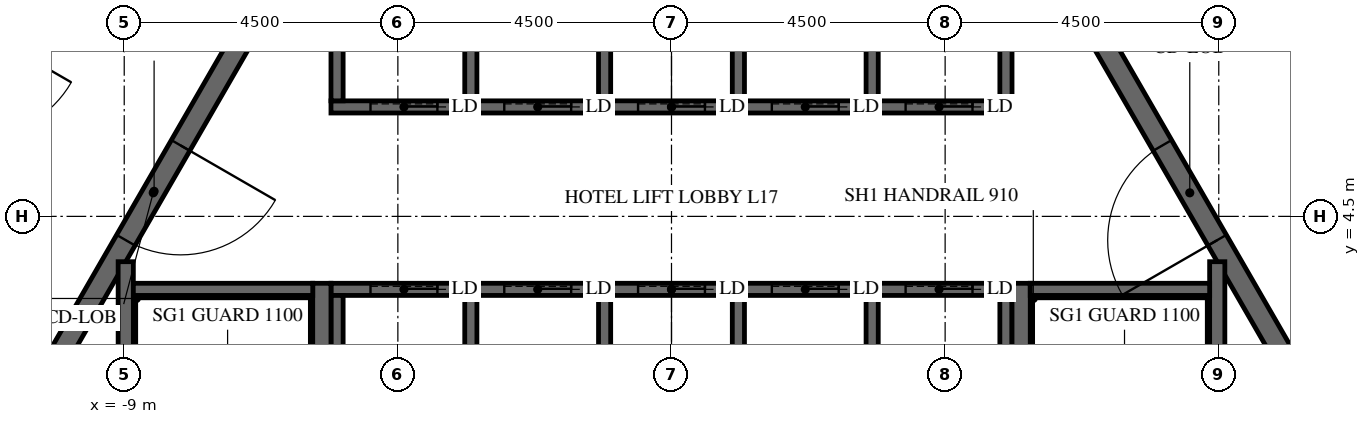
"""IFC4 building model, lengths in metres.
Left out: names, types, materials, properties, quantities, classifications, styles, units other than length and angle.
Written with IfcOpenShell. Run it as: python <this file> out.ifc"""

import sys

from ifc_helpers import new_model, si_unit, direction, frame, frame_2d, origin, place, context, subcontext, project, spatial, polyline, rectangle, outline, extrude, element, fill, save


model = new_model("IFC4")
c1 = context("Model", 3, precision=1e-05, world=origin(), true_north=direction((0.0, 1.0)))
c2 = subcontext(c1, "Body", "Model", "MODEL_VIEW")
j1 = project(units=[si_unit("LENGTHUNIT", "METRE"), si_unit("PLANEANGLEUNIT", "RADIAN")], contexts=[c1])
p1 = place(None, origin())
s1 = spatial("IfcSite", under=j1, at=p1, CompositionType="ELEMENT")
p2 = place(p1, origin())
s2 = spatial("IfcBuilding", under=s1, at=p2, CompositionType="ELEMENT")
p3 = place(p2, frame((0.0, 0.0, 80.4)))
s3 = spatial("IfcBuildingStorey", under=s2, at=p3, CompositionType="ELEMENT", Elevation=80.4)
p4 = place(p3, frame((-7.91, 13.7, -0.15), z_axis=(0.0, 0.0, 1.0), x_axis=(-0.499999880136, -0.866025472988, 0.0)))
e1 = element("IfcWall", 1, at=p4, inside=s3, PredefinedType="SHEAR", context=c2, shape_type="SweptSolid", body=[
    extrude(outline(polyline([(-0.173, -0.3), (15.993, -0.3), (15.646, 0.3), (0.173, 0.3), (-0.173, -0.3)])), origin(), (0.0, 0.0, 1.0), 3.9),
])
p5 = place(p4, frame((7.039, 0.0, 0.15)))
e2 = element("IfcOpeningElement", 2, at=p5, cuts=e1, PredefinedType="OPENING", context=c2, shape_type="SweptSolid", body=[
    extrude(rectangle(XDim=1.8, YDim=2.4, at=frame_2d((0.9, 1.2))), frame((0.0, 0.31, 0.0), z_axis=(0.0, -1.0, 0.0), x_axis=(1.0, 0.0, 0.0)), (0.0, 0.0, 1.0), 0.62),
])
p6 = place(p3, frame((15.819, 0.0, -0.15), z_axis=(0.0, 0.0, 1.0), x_axis=(-0.499999880136, 0.866025472988, 0.0)))
e3 = element("IfcWall", 3, at=p6, inside=s3, PredefinedType="SHEAR", context=c2, shape_type="SweptSolid", body=[
    extrude(outline(polyline([(-0.173, -0.3), (15.993, -0.3), (15.646, 0.3), (0.173, 0.3), (-0.173, -0.3)])), origin(), (0.0, 0.0, 1.0), 3.9),
])
p7 = place(p6, frame((6.981, 0.0, 0.15)))
e4 = element("IfcOpeningElement", 4, at=p7, cuts=e3, PredefinedType="OPENING", context=c2, shape_type="SweptSolid", body=[
    extrude(rectangle(XDim=1.8, YDim=2.4, at=frame_2d((0.9, 1.2))), frame((0.0, 0.31, 0.0), z_axis=(0.0, -1.0, 0.0), x_axis=(1.0, 0.0, 0.0)), (0.0, 0.0, 1.0), 0.62),
])
p8 = place(p3, frame((-5.673, 9.825, -0.15), z_axis=(0.0, 0.0, 1.0), x_axis=(-0.499995046907, -0.866028263435, 0.0)))
e5 = element("IfcWall", 5, at=p8, inside=s3, PredefinedType="SHEAR", context=c2, shape_type="SweptSolid", body=[
    extrude(outline(polyline([(-0.101, -0.175), (11.446, -0.175), (11.244, 0.175), (0.101, 0.175), (-0.101, -0.175)])), origin(), (0.0, 0.0, 1.0), 3.9),
])
p9 = place(p8, frame((4.801, 0.0, 0.15)))
e6 = element("IfcOpeningElement", 6, at=p9, cuts=e5, PredefinedType="OPENING", context=c2, shape_type="SweptSolid", body=[
    extrude(rectangle(XDim=1.8, YDim=2.4, at=frame_2d((0.9, 1.2))), frame((0.0, 0.185, 0.0), z_axis=(0.0, -1.0, 0.0), x_axis=(1.0, 0.0, 0.0)), (0.0, 0.0, 1.0), 0.37),
])
p10 = place(p3, frame((11.345, 0.0, -0.15), z_axis=(0.0, 0.0, 1.0), x_axis=(-0.499995046907, 0.866028263435, 0.0)))
e7 = element("IfcWall", 7, at=p10, inside=s3, PredefinedType="SHEAR", context=c2, shape_type="SweptSolid", body=[
    extrude(outline(polyline([(-0.101, -0.175), (11.446, -0.175), (11.244, 0.175), (0.101, 0.175), (-0.101, -0.175)])), origin(), (0.0, 0.0, 1.0), 3.9),
])
p11 = place(p10, frame((4.744, 0.0, 0.15)))
e8 = element("IfcOpeningElement", 8, at=p11, cuts=e7, PredefinedType="OPENING", context=c2, shape_type="SweptSolid", body=[
    extrude(rectangle(XDim=1.8, YDim=2.4, at=frame_2d((0.9, 1.2))), frame((0.0, 0.185, 0.0), z_axis=(0.0, -1.0, 0.0), x_axis=(1.0, 0.0, 0.0)), (0.0, 0.0, 1.0), 0.37),
])
p12 = place(p3, frame((-5.6, 6.3, -0.25), z_axis=(0.0, 0.0, 1.0), x_axis=(1.0, 0.0, 0.0)))
e9 = element("IfcWall", 9, at=p12, inside=s3, PredefinedType="SHEAR", context=c2, shape_type="SweptSolid", body=[
    extrude(rectangle(XDim=11.2, YDim=0.2, at=frame_2d((5.6, 0.0))), origin(), (0.0, 0.0, 1.0), 3.9),
])
p13 = place(p12, frame((0.65, 0.0, 0.25)))
e10 = element("IfcOpeningElement", 10, at=p13, cuts=e9, PredefinedType="OPENING", context=c2, shape_type="SweptSolid", body=[
    extrude(rectangle(XDim=1.1, YDim=2.1, at=frame_2d((0.55, 1.05))), frame((0.0, 0.11, 0.0), z_axis=(0.0, -1.0, 0.0), x_axis=(1.0, 0.0, 0.0)), (0.0, 0.0, 1.0), 0.22),
])
p14 = place(p12, frame((2.85, 0.0, 0.25)))
e11 = element("IfcOpeningElement", 11, at=p14, cuts=e9, PredefinedType="OPENING", context=c2, shape_type="SweptSolid", body=[
    extrude(rectangle(XDim=1.1, YDim=2.1, at=frame_2d((0.55, 1.05))), frame((0.0, 0.11, 0.0), z_axis=(0.0, -1.0, 0.0), x_axis=(1.0, 0.0, 0.0)), (0.0, 0.0, 1.0), 0.22),
])
p15 = place(p12, frame((5.05, 0.0, 0.25)))
e12 = element("IfcOpeningElement", 12, at=p15, cuts=e9, PredefinedType="OPENING", context=c2, shape_type="SweptSolid", body=[
    extrude(rectangle(XDim=1.1, YDim=2.1, at=frame_2d((0.55, 1.05))), frame((0.0, 0.11, 0.0), z_axis=(0.0, -1.0, 0.0), x_axis=(1.0, 0.0, 0.0)), (0.0, 0.0, 1.0), 0.22),
])
p16 = place(p12, frame((7.25, 0.0, 0.25)))
e13 = element("IfcOpeningElement", 13, at=p16, cuts=e9, PredefinedType="OPENING", context=c2, shape_type="SweptSolid", body=[
    extrude(rectangle(XDim=1.1, YDim=2.1, at=frame_2d((0.55, 1.05))), frame((0.0, 0.11, 0.0), z_axis=(0.0, -1.0, 0.0), x_axis=(1.0, 0.0, 0.0)), (0.0, 0.0, 1.0), 0.22),
])
p17 = place(p12, frame((9.45, 0.0, 0.25)))
e14 = element("IfcOpeningElement", 14, at=p17, cuts=e9, PredefinedType="OPENING", context=c2, shape_type="SweptSolid", body=[
    extrude(rectangle(XDim=1.1, YDim=2.1, at=frame_2d((0.55, 1.05))), frame((0.0, 0.11, 0.0), z_axis=(0.0, -1.0, 0.0), x_axis=(1.0, 0.0, 0.0)), (0.0, 0.0, 1.0), 0.22),
])
for number, where, z_axis, x_axis in (
    (15, (-5.5, 6.4, -0.25), (0.0, 0.0, 1.0), (0.0, 1.0, 0.0)),
    (16, (-3.3, 6.4, -0.25), (0.0, 0.0, 1.0), (0.0, 1.0, 0.0)),
    (17, (-1.1, 6.4, -0.25), (0.0, 0.0, 1.0), (0.0, 1.0, 0.0)),
    (18, (1.1, 6.4, -0.25), (0.0, 0.0, 1.0), (0.0, 1.0, 0.0)),
    (19, (3.3, 6.4, -0.25), (0.0, 0.0, 1.0), (0.0, 1.0, 0.0)),
    (20, (5.5, 6.4, -0.25), (0.0, 0.0, 1.0), (0.0, 1.0, 0.0)),
):
    element("IfcWall", number, at=place(p3, frame(where, z_axis=z_axis, x_axis=x_axis)), inside=s3, PredefinedType="SHEAR", context=c2, shape_type="SweptSolid", body=[
        extrude(rectangle(XDim=2.9, YDim=0.2, at=frame_2d((1.45, 0.0))), origin(), (0.0, 0.0, 1.0), 3.9),
    ])
p18 = place(p3, frame((-5.6, 3.3, -0.25), z_axis=(0.0, 0.0, 1.0), x_axis=(1.0, 0.0, 0.0)))
e21 = element("IfcWall", 21, at=p18, inside=s3, PredefinedType="SHEAR", context=c2, shape_type="SweptSolid", body=[
    extrude(rectangle(XDim=11.2, YDim=0.2, at=frame_2d((5.6, 0.0))), origin(), (0.0, 0.0, 1.0), 3.9),
])
p19 = place(p18, frame((0.65, 0.0, 0.25)))
e22 = element("IfcOpeningElement", 22, at=p19, cuts=e21, PredefinedType="OPENING", context=c2, shape_type="SweptSolid", body=[
    extrude(rectangle(XDim=1.1, YDim=2.1, at=frame_2d((0.55, 1.05))), frame((0.0, 0.11, 0.0), z_axis=(0.0, -1.0, 0.0), x_axis=(1.0, 0.0, 0.0)), (0.0, 0.0, 1.0), 0.22),
])
p20 = place(p18, frame((2.85, 0.0, 0.25)))
e23 = element("IfcOpeningElement", 23, at=p20, cuts=e21, PredefinedType="OPENING", context=c2, shape_type="SweptSolid", body=[
    extrude(rectangle(XDim=1.1, YDim=2.1, at=frame_2d((0.55, 1.05))), frame((0.0, 0.11, 0.0), z_axis=(0.0, -1.0, 0.0), x_axis=(1.0, 0.0, 0.0)), (0.0, 0.0, 1.0), 0.22),
])
p21 = place(p18, frame((5.05, 0.0, 0.25)))
e24 = element("IfcOpeningElement", 24, at=p21, cuts=e21, PredefinedType="OPENING", context=c2, shape_type="SweptSolid", body=[
    extrude(rectangle(XDim=1.1, YDim=2.1, at=frame_2d((0.55, 1.05))), frame((0.0, 0.11, 0.0), z_axis=(0.0, -1.0, 0.0), x_axis=(1.0, 0.0, 0.0)), (0.0, 0.0, 1.0), 0.22),
])
p22 = place(p18, frame((7.25, 0.0, 0.25)))
e25 = element("IfcOpeningElement", 25, at=p22, cuts=e21, PredefinedType="OPENING", context=c2, shape_type="SweptSolid", body=[
    extrude(rectangle(XDim=1.1, YDim=2.1, at=frame_2d((0.55, 1.05))), frame((0.0, 0.11, 0.0), z_axis=(0.0, -1.0, 0.0), x_axis=(1.0, 0.0, 0.0)), (0.0, 0.0, 1.0), 0.22),
])
p23 = place(p18, frame((9.45, 0.0, 0.25)))
e26 = element("IfcOpeningElement", 26, at=p23, cuts=e21, PredefinedType="OPENING", context=c2, shape_type="SweptSolid", body=[
    extrude(rectangle(XDim=1.1, YDim=2.1, at=frame_2d((0.55, 1.05))), frame((0.0, 0.11, 0.0), z_axis=(0.0, -1.0, 0.0), x_axis=(1.0, 0.0, 0.0)), (0.0, 0.0, 1.0), 0.22),
])
for number, where, z_axis, x_axis in (
    (27, (-5.5, 0.1, -0.25), (0.0, 0.0, 1.0), (0.0, 1.0, 0.0)),
    (28, (-3.3, 0.1, -0.25), (0.0, 0.0, 1.0), (0.0, 1.0, 0.0)),
    (29, (-1.1, 0.1, -0.25), (0.0, 0.0, 1.0), (0.0, 1.0, 0.0)),
    (30, (1.1, 0.1, -0.25), (0.0, 0.0, 1.0), (0.0, 1.0, 0.0)),
    (31, (3.3, 0.1, -0.25), (0.0, 0.0, 1.0), (0.0, 1.0, 0.0)),
    (32, (5.5, 0.1, -0.25), (0.0, 0.0, 1.0), (0.0, 1.0, 0.0)),
):
    element("IfcWall", number, at=place(p3, frame(where, z_axis=z_axis, x_axis=x_axis)), inside=s3, PredefinedType="SHEAR", context=c2, shape_type="SweptSolid", body=[
        extrude(rectangle(XDim=3.1, YDim=0.2, at=frame_2d((1.55, 0.0))), origin(), (0.0, 0.0, 1.0), 3.9),
    ])
p24 = place(p3, frame((5.75, -3.4, -0.25), z_axis=(0.0, 0.0, 1.0), x_axis=(0.0, 1.0, 0.0)))
e33 = element("IfcWall", 33, at=p24, inside=s3, PredefinedType="SHEAR", context=c2, shape_type="SweptSolid", body=[
    extrude(rectangle(XDim=6.8, YDim=0.3, at=frame_2d((3.4, 0.0))), origin(), (0.0, 0.0, 1.0), 3.9),
])
p25 = place(p3, frame((8.975, -3.755, -0.25), z_axis=(0.0, 0.0, 1.0), x_axis=(0.0, 1.0, 0.0)))
e34 = element("IfcWall", 34, at=p25, inside=s3, PredefinedType="SHEAR", context=c2, shape_type="SweptSolid", body=[
    extrude(rectangle(XDim=7.51, YDim=0.25, at=frame_2d((3.755, 0.0))), origin(), (0.0, 0.0, 1.0), 3.9),
])
p26 = place(p3, frame((5.9, 3.3, -0.25), z_axis=(0.0, 0.0, 1.0), x_axis=(1.0, 0.0, 0.0)))
e35 = element("IfcWall", 35, at=p26, inside=s3, PredefinedType="SHEAR", context=c2, shape_type="SweptSolid", body=[
    extrude(rectangle(XDim=2.95, YDim=0.2, at=frame_2d((1.475, 0.0))), origin(), (0.0, 0.0, 1.0), 3.9),
])
p27 = place(p3, frame((-5.75, -3.4, -0.25), z_axis=(0.0, 0.0, 1.0), x_axis=(0.0, 1.0, 0.0)))
e36 = element("IfcWall", 36, at=p27, inside=s3, PredefinedType="SHEAR", context=c2, shape_type="SweptSolid", body=[
    extrude(rectangle(XDim=6.8, YDim=0.3, at=frame_2d((3.4, 0.0))), origin(), (0.0, 0.0, 1.0), 3.9),
])
p28 = place(p3, frame((-8.975, -3.755, -0.25), z_axis=(0.0, 0.0, 1.0), x_axis=(0.0, 1.0, 0.0)))
e37 = element("IfcWall", 37, at=p28, inside=s3, PredefinedType="SHEAR", context=c2, shape_type="SweptSolid", body=[
    extrude(rectangle(XDim=7.51, YDim=0.25, at=frame_2d((3.755, 0.0))), origin(), (0.0, 0.0, 1.0), 3.9),
])
p29 = place(p3, frame((-8.85, 3.3, -0.25), z_axis=(0.0, 0.0, 1.0), x_axis=(1.0, 0.0, 0.0)))
e38 = element("IfcWall", 38, at=p29, inside=s3, PredefinedType="SHEAR", context=c2, shape_type="SweptSolid", body=[
    extrude(rectangle(XDim=2.95, YDim=0.2, at=frame_2d((1.475, 0.0))), origin(), (0.0, 0.0, 1.0), 3.9),
])
p30 = place(p9, origin())
e39 = element("IfcDoor", 39, at=p30, inside=s3, OperationType="DOUBLE_DOOR_SINGLE_SWING", PredefinedType="DOOR", context=c2, shape_type="SweptSolid", body=[
    extrude(rectangle(XDim=1.8, YDim=2.4, at=frame_2d((0.9, 1.2))), frame((0.0, 0.025, 0.0), z_axis=(0.0, -1.0, 0.0), x_axis=(1.0, 0.0, 0.0)), (0.0, 0.0, 1.0), 0.05),
])
fill(e6, e39)
p31 = place(p11, origin())
e40 = element("IfcDoor", 40, at=p31, inside=s3, OperationType="DOUBLE_DOOR_SINGLE_SWING", PredefinedType="DOOR", context=c2, shape_type="SweptSolid", body=[
    extrude(rectangle(XDim=1.8, YDim=2.4, at=frame_2d((0.9, 1.2))), frame((0.0, 0.025, 0.0), z_axis=(0.0, -1.0, 0.0), x_axis=(1.0, 0.0, 0.0)), (0.0, 0.0, 1.0), 0.05),
])
fill(e8, e40)
p32 = place(p13, origin())
e41 = element("IfcDoor", 41, at=p32, inside=s3, OperationType="SLIDING_TO_LEFT", PredefinedType="DOOR", context=c2, shape_type="SweptSolid", body=[
    extrude(rectangle(XDim=1.1, YDim=2.1, at=frame_2d((0.55, 1.05))), frame((0.0, 0.025, 0.0), z_axis=(0.0, -1.0, 0.0), x_axis=(1.0, 0.0, 0.0)), (0.0, 0.0, 1.0), 0.05),
])
fill(e10, e41)
p33 = place(p14, origin())
e42 = element("IfcDoor", 42, at=p33, inside=s3, OperationType="SLIDING_TO_LEFT", PredefinedType="DOOR", context=c2, shape_type="SweptSolid", body=[
    extrude(rectangle(XDim=1.1, YDim=2.1, at=frame_2d((0.55, 1.05))), frame((0.0, 0.025, 0.0), z_axis=(0.0, -1.0, 0.0), x_axis=(1.0, 0.0, 0.0)), (0.0, 0.0, 1.0), 0.05),
])
fill(e11, e42)
p34 = place(p15, origin())
e43 = element("IfcDoor", 43, at=p34, inside=s3, OperationType="SLIDING_TO_LEFT", PredefinedType="DOOR", context=c2, shape_type="SweptSolid", body=[
    extrude(rectangle(XDim=1.1, YDim=2.1, at=frame_2d((0.55, 1.05))), frame((0.0, 0.025, 0.0), z_axis=(0.0, -1.0, 0.0), x_axis=(1.0, 0.0, 0.0)), (0.0, 0.0, 1.0), 0.05),
])
fill(e12, e43)
p35 = place(p16, origin())
e44 = element("IfcDoor", 44, at=p35, inside=s3, OperationType="SLIDING_TO_LEFT", PredefinedType="DOOR", context=c2, shape_type="SweptSolid", body=[
    extrude(rectangle(XDim=1.1, YDim=2.1, at=frame_2d((0.55, 1.05))), frame((0.0, 0.025, 0.0), z_axis=(0.0, -1.0, 0.0), x_axis=(1.0, 0.0, 0.0)), (0.0, 0.0, 1.0), 0.05),
])
fill(e13, e44)
p36 = place(p17, origin())
e45 = element("IfcDoor", 45, at=p36, inside=s3, OperationType="SLIDING_TO_LEFT", PredefinedType="DOOR", context=c2, shape_type="SweptSolid", body=[
    extrude(rectangle(XDim=1.1, YDim=2.1, at=frame_2d((0.55, 1.05))), frame((0.0, 0.025, 0.0), z_axis=(0.0, -1.0, 0.0), x_axis=(1.0, 0.0, 0.0)), (0.0, 0.0, 1.0), 0.05),
])
fill(e14, e45)
p37 = place(p19, origin())
e46 = element("IfcDoor", 46, at=p37, inside=s3, OperationType="SLIDING_TO_LEFT", PredefinedType="DOOR", context=c2, shape_type="SweptSolid", body=[
    extrude(rectangle(XDim=1.1, YDim=2.1, at=frame_2d((0.55, 1.05))), frame((0.0, 0.025, 0.0), z_axis=(0.0, -1.0, 0.0), x_axis=(1.0, 0.0, 0.0)), (0.0, 0.0, 1.0), 0.05),
])
fill(e22, e46)
p38 = place(p20, origin())
e47 = element("IfcDoor", 47, at=p38, inside=s3, OperationType="SLIDING_TO_LEFT", PredefinedType="DOOR", context=c2, shape_type="SweptSolid", body=[
    extrude(rectangle(XDim=1.1, YDim=2.1, at=frame_2d((0.55, 1.05))), frame((0.0, 0.025, 0.0), z_axis=(0.0, -1.0, 0.0), x_axis=(1.0, 0.0, 0.0)), (0.0, 0.0, 1.0), 0.05),
])
fill(e23, e47)
p39 = place(p21, origin())
e48 = element("IfcDoor", 48, at=p39, inside=s3, OperationType="SLIDING_TO_LEFT", PredefinedType="DOOR", context=c2, shape_type="SweptSolid", body=[
    extrude(rectangle(XDim=1.1, YDim=2.1, at=frame_2d((0.55, 1.05))), frame((0.0, 0.025, 0.0), z_axis=(0.0, -1.0, 0.0), x_axis=(1.0, 0.0, 0.0)), (0.0, 0.0, 1.0), 0.05),
])
fill(e24, e48)
p40 = place(p22, origin())
e49 = element("IfcDoor", 49, at=p40, inside=s3, OperationType="SLIDING_TO_LEFT", PredefinedType="DOOR", context=c2, shape_type="SweptSolid", body=[
    extrude(rectangle(XDim=1.1, YDim=2.1, at=frame_2d((0.55, 1.05))), frame((0.0, 0.025, 0.0), z_axis=(0.0, -1.0, 0.0), x_axis=(1.0, 0.0, 0.0)), (0.0, 0.0, 1.0), 0.05),
])
fill(e25, e49)
p41 = place(p23, origin())
e50 = element("IfcDoor", 50, at=p41, inside=s3, OperationType="SLIDING_TO_LEFT", PredefinedType="DOOR", context=c2, shape_type="SweptSolid", body=[
    extrude(rectangle(XDim=1.1, YDim=2.1, at=frame_2d((0.55, 1.05))), frame((0.0, 0.025, 0.0), z_axis=(0.0, -1.0, 0.0), x_axis=(1.0, 0.0, 0.0)), (0.0, 0.0, 1.0), 0.05),
])
fill(e26, e50)
save(model, sys.argv[1])
